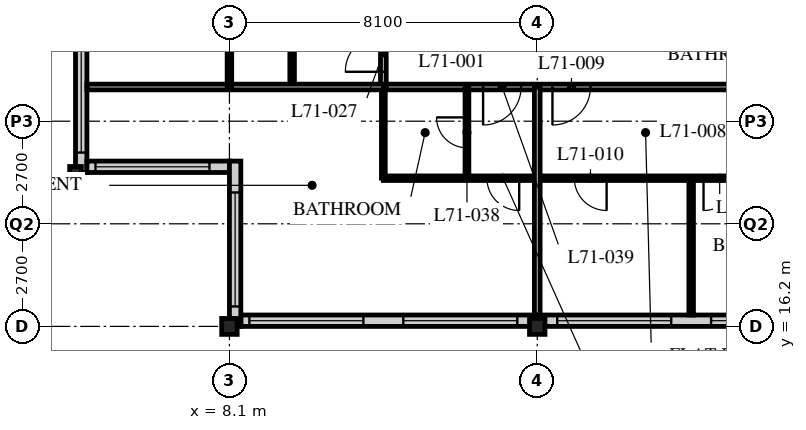
"""IFC4 building model, lengths in metres.
Left out: names, types, materials, properties, quantities, classifications, styles, units other than length and angle.
Written with IfcOpenShell. Run it as: python <this file> out.ifc"""

import sys

from ifc_helpers import new_model, si_unit, direction, frame, frame_2d, origin, origin_2d, place, context, subcontext, project, spatial, rectangle, i_section, extrude, element, fill, save


model = new_model("IFC4")
c1 = context("Model", 3, precision=1e-05, world=origin(), true_north=direction((0.0, 1.0)))
c2 = subcontext(c1, "Body", "Model", "MODEL_VIEW")
j1 = project(units=[si_unit("LENGTHUNIT", "METRE"), si_unit("PLANEANGLEUNIT", "RADIAN")], contexts=[c1])
p1 = place(None, origin())
s1 = spatial("IfcSite", under=j1, at=p1, CompositionType="ELEMENT")
p2 = place(p1, origin())
s2 = spatial("IfcBuilding", under=s1, at=p2, CompositionType="ELEMENT")
p3 = place(p2, frame((0.0, 0.0, 277.5)))
s3 = spatial("IfcBuildingStorey", under=s2, at=p3, CompositionType="ELEMENT", Elevation=277.5)
p4 = place(p3, frame((4.05, 20.25, 0.0), z_axis=(0.0, 0.0, 1.0), x_axis=(1.0, 0.0, 0.0)))
e1 = element("IfcColumn", 1, at=p4, inside=s3, PredefinedType="COLUMN", context=c2, shape_type="SweptSolid", body=[
    extrude(i_section(OverallWidth=0.307, OverallDepth=0.314, WebThickness=0.012, FlangeThickness=0.019, FilletRadius=0.015, at=origin_2d()), origin(), (0.0, 0.0, 1.0), 3.9),
])
for number, where, z_axis, x_axis in (
    (2, (8.1, 16.2, 0.0), (0.0, 0.0, 1.0), (1.0, 0.0, 0.0)),
    (3, (16.2, 16.2, 0.0), (0.0, 0.0, 1.0), (1.0, 0.0, 0.0)),
):
    element("IfcColumn", number, at=place(p3, frame(where, z_axis=z_axis, x_axis=x_axis)), inside=s3, PredefinedType="COLUMN", context=c2, shape_type="SweptSolid", body=[
        extrude(i_section(OverallWidth=0.407, OverallDepth=0.419, WebThickness=0.031, FlangeThickness=0.049, FilletRadius=0.015, at=origin_2d()), origin(), (0.0, 0.0, 1.0), 3.9),
    ])
p5 = place(p3, frame((8.4, 16.35, 0.0), z_axis=(0.0, 0.0, 1.0), x_axis=(1.0, 0.0, 0.0)))
e4 = element("IfcWall", 4, at=p5, inside=s3, PredefinedType="SOLIDWALL", context=c2, shape_type="SweptSolid", body=[
    extrude(rectangle(XDim=40.2, YDim=0.3, at=frame_2d((20.1, 0.0))), origin(), (0.0, 0.0, 1.0), 3.69),
])
p6 = place(p5, frame((0.225, 0.0, 0.6)))
e5 = element("IfcOpeningElement", 5, at=p6, cuts=e4, PredefinedType="OPENING", context=c2, shape_type="SweptSolid", body=[
    extrude(rectangle(XDim=3.0, YDim=2.4, at=frame_2d((1.5, 1.2))), frame((0.0, 0.16, 0.0), z_axis=(0.0, -1.0, 0.0), x_axis=(1.0, 0.0, 0.0)), (0.0, 0.0, 1.0), 0.32),
])
p7 = place(p5, frame((4.275, 0.0, 0.6)))
e6 = element("IfcOpeningElement", 6, at=p7, cuts=e4, PredefinedType="OPENING", context=c2, shape_type="SweptSolid", body=[
    extrude(rectangle(XDim=3.0, YDim=2.4, at=frame_2d((1.5, 1.2))), frame((0.0, 0.16, 0.0), z_axis=(0.0, -1.0, 0.0), x_axis=(1.0, 0.0, 0.0)), (0.0, 0.0, 1.0), 0.32),
])
p8 = place(p5, frame((8.325, 0.0, 0.6)))
e7 = element("IfcOpeningElement", 7, at=p8, cuts=e4, PredefinedType="OPENING", context=c2, shape_type="SweptSolid", body=[
    extrude(rectangle(XDim=3.0, YDim=2.4, at=frame_2d((1.5, 1.2))), frame((0.0, 0.16, 0.0), z_axis=(0.0, -1.0, 0.0), x_axis=(1.0, 0.0, 0.0)), (0.0, 0.0, 1.0), 0.32),
])
p9 = place(p5, frame((12.375, 0.0, 0.6)))
e8 = element("IfcOpeningElement", 8, at=p9, cuts=e4, PredefinedType="OPENING", context=c2, shape_type="SweptSolid", body=[
    extrude(rectangle(XDim=3.0, YDim=2.4, at=frame_2d((1.5, 1.2))), frame((0.0, 0.16, 0.0), z_axis=(0.0, -1.0, 0.0), x_axis=(1.0, 0.0, 0.0)), (0.0, 0.0, 1.0), 0.32),
])
p10 = place(p5, frame((16.425, 0.0, 0.6)))
e9 = element("IfcOpeningElement", 9, at=p10, cuts=e4, PredefinedType="OPENING", context=c2, shape_type="SweptSolid", body=[
    extrude(rectangle(XDim=3.0, YDim=2.4, at=frame_2d((1.5, 1.2))), frame((0.0, 0.16, 0.0), z_axis=(0.0, -1.0, 0.0), x_axis=(1.0, 0.0, 0.0)), (0.0, 0.0, 1.0), 0.32),
])
p11 = place(p5, frame((20.475, 0.0, 0.6)))
e10 = element("IfcOpeningElement", 10, at=p11, cuts=e4, PredefinedType="OPENING", context=c2, shape_type="SweptSolid", body=[
    extrude(rectangle(XDim=3.0, YDim=2.4, at=frame_2d((1.5, 1.2))), frame((0.0, 0.16, 0.0), z_axis=(0.0, -1.0, 0.0), x_axis=(1.0, 0.0, 0.0)), (0.0, 0.0, 1.0), 0.32),
])
p12 = place(p5, frame((24.525, 0.0, 0.6)))
e11 = element("IfcOpeningElement", 11, at=p12, cuts=e4, PredefinedType="OPENING", context=c2, shape_type="SweptSolid", body=[
    extrude(rectangle(XDim=3.0, YDim=2.4, at=frame_2d((1.5, 1.2))), frame((0.0, 0.16, 0.0), z_axis=(0.0, -1.0, 0.0), x_axis=(1.0, 0.0, 0.0)), (0.0, 0.0, 1.0), 0.32),
])
p13 = place(p5, frame((28.575, 0.0, 0.6)))
e12 = element("IfcOpeningElement", 12, at=p13, cuts=e4, PredefinedType="OPENING", context=c2, shape_type="SweptSolid", body=[
    extrude(rectangle(XDim=3.0, YDim=2.4, at=frame_2d((1.5, 1.2))), frame((0.0, 0.16, 0.0), z_axis=(0.0, -1.0, 0.0), x_axis=(1.0, 0.0, 0.0)), (0.0, 0.0, 1.0), 0.32),
])
p14 = place(p5, frame((32.625, 0.0, 0.6)))
e13 = element("IfcOpeningElement", 13, at=p14, cuts=e4, PredefinedType="OPENING", context=c2, shape_type="SweptSolid", body=[
    extrude(rectangle(XDim=3.0, YDim=2.4, at=frame_2d((1.5, 1.2))), frame((0.0, 0.16, 0.0), z_axis=(0.0, -1.0, 0.0), x_axis=(1.0, 0.0, 0.0)), (0.0, 0.0, 1.0), 0.32),
])
p15 = place(p5, frame((36.675, 0.0, 0.6)))
e14 = element("IfcOpeningElement", 14, at=p15, cuts=e4, PredefinedType="OPENING", context=c2, shape_type="SweptSolid", body=[
    extrude(rectangle(XDim=3.0, YDim=2.4, at=frame_2d((1.5, 1.2))), frame((0.0, 0.16, 0.0), z_axis=(0.0, -1.0, 0.0), x_axis=(1.0, 0.0, 0.0)), (0.0, 0.0, 1.0), 0.32),
])
p16 = place(p3, frame((4.2, 24.6, 0.0), z_axis=(0.0, 0.0, 1.0), x_axis=(0.0, -1.0, 0.0)))
e15 = element("IfcWall", 15, at=p16, inside=s3, PredefinedType="SOLIDWALL", context=c2, shape_type="SweptSolid", body=[
    extrude(rectangle(XDim=4.35, YDim=0.3, at=frame_2d((2.175, 0.0))), origin(), (0.0, 0.0, 1.0), 3.69),
])
p17 = place(p16, frame((0.825, 0.0, 0.6)))
e16 = element("IfcOpeningElement", 16, at=p17, cuts=e15, PredefinedType="OPENING", context=c2, shape_type="SweptSolid", body=[
    extrude(rectangle(XDim=3.0, YDim=2.3, at=frame_2d((1.5, 1.15))), frame((0.0, 0.16, 0.0), z_axis=(0.0, -1.0, 0.0), x_axis=(1.0, 0.0, 0.0)), (0.0, 0.0, 1.0), 0.32),
])
p18 = place(p3, frame((4.35, 20.4, 0.0), z_axis=(0.0, 0.0, 1.0), x_axis=(1.0, 0.0, 0.0)))
e17 = element("IfcWall", 17, at=p18, inside=s3, PredefinedType="SOLIDWALL", context=c2, shape_type="SweptSolid", body=[
    extrude(rectangle(XDim=3.75, YDim=0.3, at=frame_2d((1.875, 0.0))), origin(), (0.0, 0.0, 1.0), 3.69),
])
p19 = place(p18, frame((0.225, 0.0, 0.6)))
e18 = element("IfcOpeningElement", 18, at=p19, cuts=e17, PredefinedType="OPENING", context=c2, shape_type="SweptSolid", body=[
    extrude(rectangle(XDim=3.0, YDim=2.3, at=frame_2d((1.5, 1.15))), frame((0.0, 0.16, 0.0), z_axis=(0.0, -1.0, 0.0), x_axis=(1.0, 0.0, 0.0)), (0.0, 0.0, 1.0), 0.32),
])
p20 = place(p3, frame((8.25, 20.55, 0.0), z_axis=(0.0, 0.0, 1.0), x_axis=(0.0, -1.0, 0.0)))
e19 = element("IfcWall", 19, at=p20, inside=s3, PredefinedType="SOLIDWALL", context=c2, shape_type="SweptSolid", body=[
    extrude(rectangle(XDim=4.35, YDim=0.3, at=frame_2d((2.175, 0.0))), origin(), (0.0, 0.0, 1.0), 3.69),
])
p21 = place(p20, frame((0.825, 0.0, 0.6)))
e20 = element("IfcOpeningElement", 20, at=p21, cuts=e19, PredefinedType="OPENING", context=c2, shape_type="SweptSolid", body=[
    extrude(rectangle(XDim=3.0, YDim=2.3, at=frame_2d((1.5, 1.15))), frame((0.0, 0.16, 0.0), z_axis=(0.0, -1.0, 0.0), x_axis=(1.0, 0.0, 0.0)), (0.0, 0.0, 1.0), 0.32),
])
p22 = place(p3, frame((12.15, 22.5, 0.0), z_axis=(0.0, 0.0, 1.0), x_axis=(1.0, 0.0, 0.0)))
e21 = element("IfcWall", 21, at=p22, inside=s3, PredefinedType="PARTITIONING", context=c2, shape_type="SweptSolid", body=[
    extrude(rectangle(XDim=24.3, YDim=0.15, at=frame_2d((12.15, 0.0))), origin(), (0.0, 0.0, 1.0), 3.69),
])
p23 = place(p22, frame((4.45, 0.0, 0.0)))
e22 = element("IfcOpeningElement", 22, at=p23, cuts=e21, PredefinedType="OPENING", context=c2, shape_type="SweptSolid", body=[
    extrude(rectangle(XDim=1.0, YDim=2.1, at=frame_2d((0.5, 1.05))), frame((0.0, 0.085, 0.0), z_axis=(0.0, -1.0, 0.0), x_axis=(1.0, 0.0, 0.0)), (0.0, 0.0, 1.0), 0.17),
])
p24 = place(p22, frame((12.55, 0.0, 0.0)))
e23 = element("IfcOpeningElement", 23, at=p24, cuts=e21, PredefinedType="OPENING", context=c2, shape_type="SweptSolid", body=[
    extrude(rectangle(XDim=1.0, YDim=2.1, at=frame_2d((0.5, 1.05))), frame((0.0, 0.085, 0.0), z_axis=(0.0, -1.0, 0.0), x_axis=(1.0, 0.0, 0.0)), (0.0, 0.0, 1.0), 0.17),
])
p25 = place(p22, frame((2.625, 0.0, 0.0)))
e24 = element("IfcOpeningElement", 24, at=p25, cuts=e21, PredefinedType="OPENING", context=c2, shape_type="SweptSolid", body=[
    extrude(rectangle(XDim=1.0, YDim=2.1, at=frame_2d((0.5, 1.05))), frame((0.0, 0.085, 0.0), z_axis=(0.0, -1.0, 0.0), x_axis=(1.0, 0.0, 0.0)), (0.0, 0.0, 1.0), 0.17),
])
p26 = place(p3, frame((12.15, 22.5, 0.0), z_axis=(0.0, 0.0, 1.0), x_axis=(0.0, 1.0, 0.0)))
e25 = element("IfcWall", 25, at=p26, inside=s3, PredefinedType="PARTITIONING", context=c2, shape_type="SweptSolid", body=[
    extrude(rectangle(XDim=30.15, YDim=0.15, at=frame_2d((15.075, 0.0))), origin(), (0.0, 0.0, 1.0), 3.69),
])
p27 = place(p26, frame((0.4, 0.0, 0.0)))
e26 = element("IfcOpeningElement", 26, at=p27, cuts=e25, PredefinedType="OPENING", context=c2, shape_type="SweptSolid", body=[
    extrude(rectangle(XDim=1.0, YDim=2.1, at=frame_2d((0.5, 1.05))), frame((0.0, 0.085, 0.0), z_axis=(0.0, -1.0, 0.0), x_axis=(1.0, 0.0, 0.0)), (0.0, 0.0, 1.0), 0.17),
])
p28 = place(p26, frame((18.4, 0.0, 0.0)))
e27 = element("IfcOpeningElement", 27, at=p28, cuts=e25, PredefinedType="OPENING", context=c2, shape_type="SweptSolid", body=[
    extrude(rectangle(XDim=1.0, YDim=2.1, at=frame_2d((0.5, 1.05))), frame((0.0, 0.085, 0.0), z_axis=(0.0, -1.0, 0.0), x_axis=(1.0, 0.0, 0.0)), (0.0, 0.0, 1.0), 0.17),
])
p29 = place(p26, frame((28.45, 0.0, 0.0)))
e28 = element("IfcOpeningElement", 28, at=p29, cuts=e25, PredefinedType="OPENING", context=c2, shape_type="SweptSolid", body=[
    extrude(rectangle(XDim=1.0, YDim=2.1, at=frame_2d((0.5, 1.05))), frame((0.0, 0.085, 0.0), z_axis=(0.0, -1.0, 0.0), x_axis=(1.0, 0.0, 0.0)), (0.0, 0.0, 1.0), 0.17),
])
p30 = place(p3, frame((20.25, 20.1, 0.0), z_axis=(0.0, 0.0, 1.0), x_axis=(0.0, -1.0, 0.0)))
e29 = element("IfcWall", 29, at=p30, inside=s3, PredefinedType="PARTITIONING", context=c2, shape_type="SweptSolid", body=[
    extrude(rectangle(XDim=3.6, YDim=0.12, at=frame_2d((1.8, 0.0))), origin(), (0.0, 0.0, 1.0), 3.69),
])
p31 = place(p3, frame((9.75, 22.5, 0.0), z_axis=(0.0, 0.0, 1.0), x_axis=(0.0, 1.0, 0.0)))
e30 = element("IfcWall", 30, at=p31, inside=s3, PredefinedType="PARTITIONING", context=c2, shape_type="SweptSolid", body=[
    extrude(rectangle(XDim=26.1, YDim=0.12, at=frame_2d((13.05, 0.0))), origin(), (0.0, 0.0, 1.0), 3.69),
])
p32 = place(p31, frame((0.975, 0.0, 0.0)))
e31 = element("IfcOpeningElement", 31, at=p32, cuts=e30, PredefinedType="OPENING", context=c2, shape_type="SweptSolid", body=[
    extrude(rectangle(XDim=0.85, YDim=2.1, at=frame_2d((0.425, 1.05))), frame((0.0, 0.07, 0.0), z_axis=(0.0, -1.0, 0.0), x_axis=(1.0, 0.0, 0.0)), (0.0, 0.0, 1.0), 0.14),
])
p33 = place(p31, frame((10.225, 0.0, 0.0)))
e32 = element("IfcOpeningElement", 32, at=p33, cuts=e30, PredefinedType="OPENING", context=c2, shape_type="SweptSolid", body=[
    extrude(rectangle(XDim=0.85, YDim=2.1, at=frame_2d((0.425, 1.05))), frame((0.0, 0.07, 0.0), z_axis=(0.0, -1.0, 0.0), x_axis=(1.0, 0.0, 0.0)), (0.0, 0.0, 1.0), 0.14),
])
p34 = place(p31, frame((14.275, 0.0, 0.0)))
e33 = element("IfcOpeningElement", 33, at=p34, cuts=e30, PredefinedType="OPENING", context=c2, shape_type="SweptSolid", body=[
    extrude(rectangle(XDim=0.85, YDim=2.1, at=frame_2d((0.425, 1.05))), frame((0.0, 0.07, 0.0), z_axis=(0.0, -1.0, 0.0), x_axis=(1.0, 0.0, 0.0)), (0.0, 0.0, 1.0), 0.14),
])
p35 = place(p31, frame((18.975, 0.0, 0.0)))
e34 = element("IfcOpeningElement", 34, at=p35, cuts=e30, PredefinedType="OPENING", context=c2, shape_type="SweptSolid", body=[
    extrude(rectangle(XDim=0.85, YDim=2.1, at=frame_2d((0.425, 1.05))), frame((0.0, 0.07, 0.0), z_axis=(0.0, -1.0, 0.0), x_axis=(1.0, 0.0, 0.0)), (0.0, 0.0, 1.0), 0.14),
])
p36 = place(p31, frame((22.375, 0.0, 0.0)))
e35 = element("IfcOpeningElement", 35, at=p36, cuts=e30, PredefinedType="OPENING", context=c2, shape_type="SweptSolid", body=[
    extrude(rectangle(XDim=0.85, YDim=2.1, at=frame_2d((0.425, 1.05))), frame((0.0, 0.07, 0.0), z_axis=(0.0, -1.0, 0.0), x_axis=(1.0, 0.0, 0.0)), (0.0, 0.0, 1.0), 0.14),
])
p37 = place(p3, frame((12.15, 20.1, 0.0), z_axis=(0.0, 0.0, 1.0), x_axis=(1.0, 0.0, 0.0)))
e36 = element("IfcWall", 36, at=p37, inside=s3, PredefinedType="PARTITIONING", context=c2, shape_type="SweptSolid", body=[
    extrude(rectangle(XDim=24.3, YDim=0.12, at=frame_2d((12.15, 0.0))), origin(), (0.0, 0.0, 1.0), 3.69),
])
p38 = place(p37, frame((5.025, 0.0, 0.0)))
e37 = element("IfcOpeningElement", 37, at=p38, cuts=e36, PredefinedType="OPENING", context=c2, shape_type="SweptSolid", body=[
    extrude(rectangle(XDim=0.85, YDim=2.1, at=frame_2d((0.425, 1.05))), frame((0.0, 0.07, 0.0), z_axis=(0.0, -1.0, 0.0), x_axis=(1.0, 0.0, 0.0)), (0.0, 0.0, 1.0), 0.14),
])
p39 = place(p37, frame((8.425, 0.0, 0.0)))
e38 = element("IfcOpeningElement", 38, at=p39, cuts=e36, PredefinedType="OPENING", context=c2, shape_type="SweptSolid", body=[
    extrude(rectangle(XDim=0.85, YDim=2.1, at=frame_2d((0.425, 1.05))), frame((0.0, 0.07, 0.0), z_axis=(0.0, -1.0, 0.0), x_axis=(1.0, 0.0, 0.0)), (0.0, 0.0, 1.0), 0.14),
])
p40 = place(p37, frame((13.125, 0.0, 0.0)))
e39 = element("IfcOpeningElement", 39, at=p40, cuts=e36, PredefinedType="OPENING", context=c2, shape_type="SweptSolid", body=[
    extrude(rectangle(XDim=0.85, YDim=2.1, at=frame_2d((0.425, 1.05))), frame((0.0, 0.07, 0.0), z_axis=(0.0, -1.0, 0.0), x_axis=(1.0, 0.0, 0.0)), (0.0, 0.0, 1.0), 0.14),
])
p41 = place(p37, frame((20.575, 0.0, 0.0)))
e40 = element("IfcOpeningElement", 40, at=p41, cuts=e36, PredefinedType="OPENING", context=c2, shape_type="SweptSolid", body=[
    extrude(rectangle(XDim=0.85, YDim=2.1, at=frame_2d((0.425, 1.05))), frame((0.0, 0.07, 0.0), z_axis=(0.0, -1.0, 0.0), x_axis=(1.0, 0.0, 0.0)), (0.0, 0.0, 1.0), 0.14),
])
p42 = place(p37, frame((2.725, 0.0, 0.0)))
e41 = element("IfcOpeningElement", 41, at=p42, cuts=e36, PredefinedType="OPENING", context=c2, shape_type="SweptSolid", body=[
    extrude(rectangle(XDim=0.85, YDim=2.1, at=frame_2d((0.425, 1.05))), frame((0.0, 0.07, 0.0), z_axis=(0.0, -1.0, 0.0), x_axis=(1.0, 0.0, 0.0)), (0.0, 0.0, 1.0), 0.14),
])
p43 = place(p3, frame((14.35, 22.5, 0.0), z_axis=(0.0, 0.0, 1.0), x_axis=(0.0, -1.0, 0.0)))
e42 = element("IfcWall", 42, at=p43, inside=s3, PredefinedType="PARTITIONING", context=c2, shape_type="SweptSolid", body=[
    extrude(rectangle(XDim=2.4, YDim=0.1, at=frame_2d((1.2, 0.0))), origin(), (0.0, 0.0, 1.0), 3.69),
])
p44 = place(p43, frame((0.8, 0.0, 0.0)))
e43 = element("IfcOpeningElement", 43, at=p44, cuts=e42, PredefinedType="OPENING", context=c2, shape_type="SweptSolid", body=[
    extrude(rectangle(XDim=0.8, YDim=2.1, at=frame_2d((0.4, 1.05))), frame((0.0, 0.06, 0.0), z_axis=(0.0, -1.0, 0.0), x_axis=(1.0, 0.0, 0.0)), (0.0, 0.0, 1.0), 0.12),
])
p45 = place(p3, frame((12.15, 22.5, 0.0), z_axis=(0.0, 0.0, 1.0), x_axis=(0.0, -1.0, 0.0)))
e44 = element("IfcWall", 44, at=p45, inside=s3, PredefinedType="PARTITIONING", context=c2, shape_type="SweptSolid", body=[
    extrude(rectangle(XDim=2.4, YDim=0.1, at=frame_2d((1.2, 0.0))), origin(), (0.0, 0.0, 1.0), 3.69),
])
p46 = place(p3, frame((4.35, 22.5, 0.0), z_axis=(0.0, 0.0, 1.0), x_axis=(1.0, 0.0, 0.0)))
e45 = element("IfcWall", 45, at=p46, inside=s3, PredefinedType="PARTITIONING", context=c2, shape_type="SweptSolid", body=[
    extrude(rectangle(XDim=7.8, YDim=0.15, at=frame_2d((3.9, 0.0))), origin(), (0.0, 0.0, 1.0), 3.69),
])
p47 = place(p3, frame((16.2, 22.5, 0.0), z_axis=(0.0, 0.0, 1.0), x_axis=(0.0, -1.0, 0.0)))
e46 = element("IfcWall", 46, at=p47, inside=s3, PredefinedType="PARTITIONING", context=c2, shape_type="SweptSolid", body=[
    extrude(rectangle(XDim=6.0, YDim=0.15, at=frame_2d((3.0, 0.0))), origin(), (0.0, 0.0, 1.0), 3.078),
])
p48 = place(p3, frame((8.1, 22.5, 0.0), z_axis=(0.0, 0.0, 1.0), x_axis=(0.0, 1.0, 0.0)))
e47 = element("IfcWall", 47, at=p48, inside=s3, PredefinedType="PARTITIONING", context=c2, shape_type="SweptSolid", body=[
    extrude(rectangle(XDim=1.597, YDim=0.12, at=frame_2d((0.798, 0.0))), origin(), (0.0, 0.0, 1.0), 3.078),
])
p49 = place(p6, origin())
e48 = element("IfcWindow", 48, at=p49, inside=s3, PartitioningType="SINGLE_PANEL", PredefinedType="WINDOW", context=c2, shape_type="SweptSolid", body=[
    extrude(rectangle(XDim=3.0, YDim=2.4, at=frame_2d((1.5, 1.2))), frame((0.0, 0.03, 0.0), z_axis=(0.0, -1.0, 0.0), x_axis=(1.0, 0.0, 0.0)), (0.0, 0.0, 1.0), 0.06),
])
fill(e5, e48)
p50 = place(p7, origin())
e49 = element("IfcWindow", 49, at=p50, inside=s3, PartitioningType="SINGLE_PANEL", PredefinedType="WINDOW", context=c2, shape_type="SweptSolid", body=[
    extrude(rectangle(XDim=3.0, YDim=2.4, at=frame_2d((1.5, 1.2))), frame((0.0, 0.03, 0.0), z_axis=(0.0, -1.0, 0.0), x_axis=(1.0, 0.0, 0.0)), (0.0, 0.0, 1.0), 0.06),
])
fill(e6, e49)
p51 = place(p8, origin())
e50 = element("IfcWindow", 50, at=p51, inside=s3, PartitioningType="SINGLE_PANEL", PredefinedType="WINDOW", context=c2, shape_type="SweptSolid", body=[
    extrude(rectangle(XDim=3.0, YDim=2.4, at=frame_2d((1.5, 1.2))), frame((0.0, 0.03, 0.0), z_axis=(0.0, -1.0, 0.0), x_axis=(1.0, 0.0, 0.0)), (0.0, 0.0, 1.0), 0.06),
])
fill(e7, e50)
p52 = place(p9, origin())
e51 = element("IfcWindow", 51, at=p52, inside=s3, PartitioningType="SINGLE_PANEL", PredefinedType="WINDOW", context=c2, shape_type="SweptSolid", body=[
    extrude(rectangle(XDim=3.0, YDim=2.4, at=frame_2d((1.5, 1.2))), frame((0.0, 0.03, 0.0), z_axis=(0.0, -1.0, 0.0), x_axis=(1.0, 0.0, 0.0)), (0.0, 0.0, 1.0), 0.06),
])
fill(e8, e51)
p53 = place(p17, origin())
e52 = element("IfcWindow", 52, at=p53, inside=s3, PartitioningType="SINGLE_PANEL", PredefinedType="WINDOW", context=c2, shape_type="SweptSolid", body=[
    extrude(rectangle(XDim=3.0, YDim=2.3, at=frame_2d((1.5, 1.15))), frame((0.0, 0.03, 0.0), z_axis=(0.0, -1.0, 0.0), x_axis=(1.0, 0.0, 0.0)), (0.0, 0.0, 1.0), 0.06),
])
fill(e16, e52)
p54 = place(p19, origin())
e53 = element("IfcWindow", 53, at=p54, inside=s3, PartitioningType="SINGLE_PANEL", PredefinedType="WINDOW", context=c2, shape_type="SweptSolid", body=[
    extrude(rectangle(XDim=3.0, YDim=2.3, at=frame_2d((1.5, 1.15))), frame((0.0, 0.03, 0.0), z_axis=(0.0, -1.0, 0.0), x_axis=(1.0, 0.0, 0.0)), (0.0, 0.0, 1.0), 0.06),
])
fill(e18, e53)
p55 = place(p21, origin())
e54 = element("IfcWindow", 54, at=p55, inside=s3, PartitioningType="SINGLE_PANEL", PredefinedType="WINDOW", context=c2, shape_type="SweptSolid", body=[
    extrude(rectangle(XDim=3.0, YDim=2.3, at=frame_2d((1.5, 1.15))), frame((0.0, 0.03, 0.0), z_axis=(0.0, -1.0, 0.0), x_axis=(1.0, 0.0, 0.0)), (0.0, 0.0, 1.0), 0.06),
])
fill(e20, e54)
p56 = place(p23, origin())
e55 = element("IfcDoor", 55, at=p56, inside=s3, OperationType="SINGLE_SWING_RIGHT", PredefinedType="DOOR", context=c2, shape_type="SweptSolid", body=[
    extrude(rectangle(XDim=1.0, YDim=2.1, at=frame_2d((0.5, 1.05))), frame((0.0, 0.025, 0.0), z_axis=(0.0, -1.0, 0.0), x_axis=(1.0, 0.0, 0.0)), (0.0, 0.0, 1.0), 0.05),
])
fill(e22, e55)
p57 = place(p38, origin())
e56 = element("IfcDoor", 56, at=p57, inside=s3, OperationType="SINGLE_SWING_LEFT", PredefinedType="DOOR", context=c2, shape_type="SweptSolid", body=[
    extrude(rectangle(XDim=0.85, YDim=2.1, at=frame_2d((0.425, 1.05))), frame((0.0, 0.025, 0.0), z_axis=(0.0, -1.0, 0.0), x_axis=(1.0, 0.0, 0.0)), (0.0, 0.0, 1.0), 0.05),
])
fill(e37, e56)
p58 = place(p39, origin())
e57 = element("IfcDoor", 57, at=p58, inside=s3, OperationType="SINGLE_SWING_RIGHT", PredefinedType="DOOR", context=c2, shape_type="SweptSolid", body=[
    extrude(rectangle(XDim=0.85, YDim=2.1, at=frame_2d((0.425, 1.05))), frame((0.0, 0.025, 0.0), z_axis=(0.0, -1.0, 0.0), x_axis=(1.0, 0.0, 0.0)), (0.0, 0.0, 1.0), 0.05),
])
fill(e38, e57)
p59 = place(p27, origin())
e58 = element("IfcDoor", 58, at=p59, inside=s3, OperationType="SINGLE_SWING_LEFT", PredefinedType="DOOR", context=c2, shape_type="SweptSolid", body=[
    extrude(rectangle(XDim=1.0, YDim=2.1, at=frame_2d((0.5, 1.05))), frame((0.0, 0.025, 0.0), z_axis=(0.0, -1.0, 0.0), x_axis=(1.0, 0.0, 0.0)), (0.0, 0.0, 1.0), 0.05),
])
fill(e26, e58)
p60 = place(p44, origin())
e59 = element("IfcDoor", 59, at=p60, inside=s3, OperationType="SINGLE_SWING_RIGHT", PredefinedType="DOOR", context=c2, shape_type="SweptSolid", body=[
    extrude(rectangle(XDim=0.8, YDim=2.1, at=frame_2d((0.4, 1.05))), frame((0.0, 0.025, 0.0), z_axis=(0.0, -1.0, 0.0), x_axis=(1.0, 0.0, 0.0)), (0.0, 0.0, 1.0), 0.05),
])
fill(e43, e59)
p61 = place(p25, origin())
e60 = element("IfcDoor", 60, at=p61, inside=s3, OperationType="SINGLE_SWING_RIGHT", PredefinedType="DOOR", context=c2, shape_type="SweptSolid", body=[
    extrude(rectangle(XDim=1.0, YDim=2.1, at=frame_2d((0.5, 1.05))), frame((0.0, 0.025, 0.0), z_axis=(0.0, -1.0, 0.0), x_axis=(1.0, 0.0, 0.0)), (0.0, 0.0, 1.0), 0.05),
])
fill(e24, e60)
p62 = place(p42, origin())
e61 = element("IfcDoor", 61, at=p62, inside=s3, OperationType="SINGLE_SWING_LEFT", PredefinedType="DOOR", context=c2, shape_type="SweptSolid", body=[
    extrude(rectangle(XDim=0.85, YDim=2.1, at=frame_2d((0.425, 1.05))), frame((0.0, 0.025, 0.0), z_axis=(0.0, -1.0, 0.0), x_axis=(1.0, 0.0, 0.0)), (0.0, 0.0, 1.0), 0.05),
])
fill(e41, e61)
save(model, sys.argv[1])
